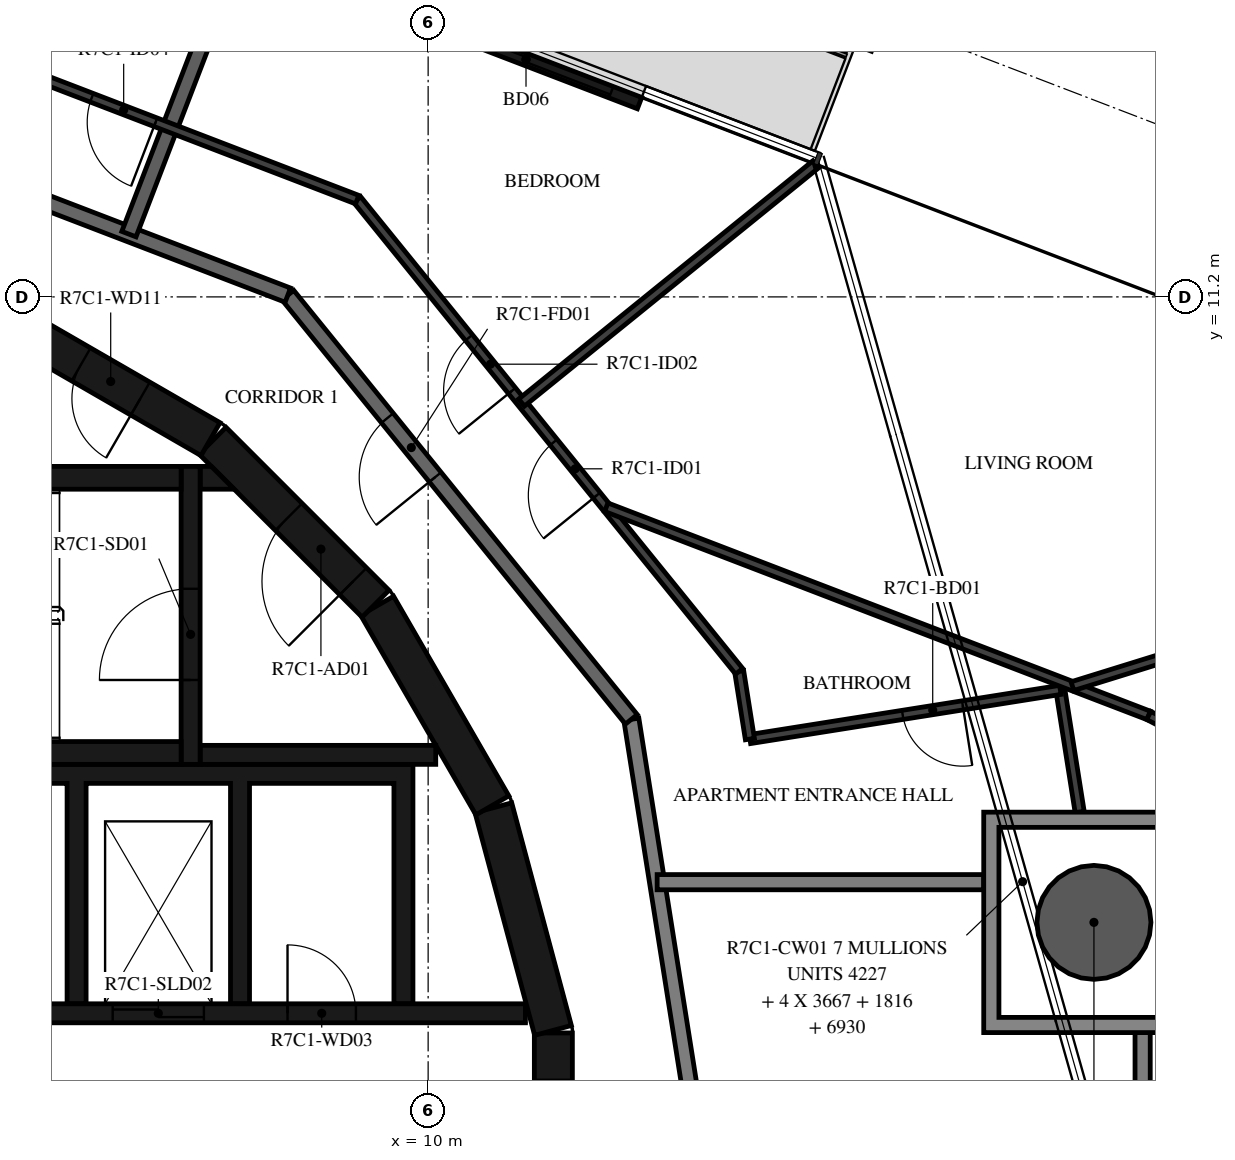
"""IFC4 building model, lengths in metres.
Left out: names, types, materials, properties, quantities, classifications, styles, units other than length and angle.
Written with IfcOpenShell. Run it as: python <this file> out.ifc"""

import sys

from ifc_helpers import new_model, si_unit, direction, frame, frame_2d, origin, origin_2d, place, context, subcontext, project, spatial, polyline, rectangle, hollow_circle, outline, extrude, element, fill, save


model = new_model("IFC4")
c1 = context("Model", 3, precision=1e-05, world=origin(), true_north=direction((0.0, 1.0)))
c2 = subcontext(c1, "Body", "Model", "MODEL_VIEW")
j1 = project(units=[si_unit("LENGTHUNIT", "METRE"), si_unit("PLANEANGLEUNIT", "RADIAN")], contexts=[c1])
p1 = place(None, origin())
s1 = spatial("IfcSite", under=j1, at=p1, CompositionType="ELEMENT")
p2 = place(p1, origin())
s2 = spatial("IfcBuilding", under=s1, at=p2, CompositionType="ELEMENT")
p3 = place(p2, frame((0.0, 0.0, 287.9)))
s3 = spatial("IfcBuildingStorey", under=s2, at=p3, CompositionType="ELEMENT", Elevation=287.9)
p4 = place(p3, frame((18.76, 2.971, -0.38), z_axis=(0.0, 0.0, 1.0), x_axis=(1.0, 0.0, 0.0)))
e1 = element("IfcColumn", 1, at=p4, inside=s3, PredefinedType="COLUMN", context=c2, shape_type="SweptSolid", body=[
    extrude(hollow_circle(Radius=0.75, WallThickness=0.035, at=origin_2d()), origin(), (0.0, 0.0, 1.0), 2.616),
])
p5 = place(p3, frame((12.781, 13.75, 0.0), z_axis=(0.0, 0.0, 1.0), x_axis=(-0.933579413923, 0.358370587381, 0.0)))
e2 = element("IfcWall", 2, at=p5, inside=s3, PredefinedType="STANDARD", context=c2, shape_type="SweptSolid", body=[
    extrude(rectangle(XDim=3.2, YDim=0.16, at=frame_2d((1.6, 0.0))), origin(), (0.0, 0.0, 1.0), 3.05),
])
p6 = place(p5, frame((0.4, 0.0, 0.0)))
e3 = element("IfcOpeningElement", 3, at=p6, cuts=e2, PredefinedType="OPENING", context=c2, shape_type="SweptSolid", body=[
    extrude(rectangle(XDim=2.4, YDim=2.4, at=frame_2d((1.2, 1.2))), frame((0.0, 0.09, 0.0), z_axis=(0.0, -1.0, 0.0), x_axis=(1.0, 0.0, 0.0)), (0.0, 0.0, 1.0), 0.18),
])
p7 = place(p3, frame((11.647, -1.516, 0.0), z_axis=(0.0, 0.0, 1.0), x_axis=(0.0, 1.0, 0.0)))
e4 = element("IfcWall", 4, at=p7, inside=s3, PredefinedType="SHEAR", context=c2, shape_type="SweptSolid", body=[
    extrude(rectangle(XDim=3.033, YDim=0.5, at=frame_2d((1.516, 0.0))), origin(), (0.0, 0.0, 1.0), 3.05),
])
p8 = place(p7, frame((0.616, 0.0, 0.0)))
e5 = element("IfcOpeningElement", 5, at=p8, cuts=e4, PredefinedType="OPENING", context=c2, shape_type="SweptSolid", body=[
    extrude(rectangle(XDim=1.8, YDim=2.1, at=frame_2d((0.9, 1.05))), frame((0.0, 0.26, 0.0), z_axis=(0.0, -1.0, 0.0), x_axis=(1.0, 0.0, 0.0)), (0.0, 0.0, 1.0), 0.52),
])
for number, where, z_axis, x_axis in (
    (6, (11.643, 1.55, 0.0), (0.0, 0.0, 1.0), (-0.259, 0.966, 0.0)),
    (7, (10.845, 4.51, 0.0), (0.0, 0.0, 1.0), (-0.5, 0.866, 0.0)),
):
    element("IfcWall", number, at=place(p3, frame(where, z_axis=z_axis, x_axis=x_axis)), inside=s3, PredefinedType="SHEAR", context=c2, shape_type="SweptSolid", body=[
        extrude(rectangle(XDim=3.033, YDim=0.5, at=frame_2d((1.516, 0.0))), origin(), (0.0, 0.0, 1.0), 3.05),
    ])
p9 = place(p3, frame((9.308, 7.164, 0.0), z_axis=(0.0, 0.0, 1.0), x_axis=(-0.707106781187, 0.707106781187, 0.0)))
e8 = element("IfcWall", 8, at=p9, inside=s3, PredefinedType="SHEAR", context=c2, shape_type="SweptSolid", body=[
    extrude(rectangle(XDim=3.032, YDim=0.5, at=frame_2d((1.516, 0.0))), origin(), (0.0, 0.0, 1.0), 3.05),
])
p10 = place(p9, frame((0.416, 0.0, 0.0)))
e9 = element("IfcOpeningElement", 9, at=p10, cuts=e8, PredefinedType="OPENING", context=c2, shape_type="SweptSolid", body=[
    extrude(rectangle(XDim=1.2, YDim=2.1, at=frame_2d((0.6, 1.05))), frame((0.0, 0.26, 0.0), z_axis=(0.0, -1.0, 0.0), x_axis=(1.0, 0.0, 0.0)), (0.0, 0.0, 1.0), 0.52),
])
p11 = place(p3, frame((7.137, 9.329, 0.0), z_axis=(0.0, 0.0, 1.0), x_axis=(-0.865975092491, 0.500087131594, 0.0)))
e10 = element("IfcWall", 10, at=p11, inside=s3, PredefinedType="SHEAR", context=c2, shape_type="SweptSolid", body=[
    extrude(rectangle(XDim=3.033, YDim=0.5, at=frame_2d((1.516, 0.0))), origin(), (0.0, 0.0, 1.0), 3.05),
])
p12 = place(p11, frame((1.066, 0.0, 0.0)))
e11 = element("IfcOpeningElement", 11, at=p12, cuts=e10, PredefinedType="OPENING", context=c2, shape_type="SweptSolid", body=[
    extrude(rectangle(XDim=0.9, YDim=2.1, at=frame_2d((0.45, 1.05))), frame((0.0, 0.26, 0.0), z_axis=(0.0, -1.0, 0.0), x_axis=(1.0, 0.0, 0.0)), (0.0, 0.0, 1.0), 0.52),
])
for number, where, z_axis, x_axis in (
    (12, (0.0, 5.2, 0.0), (0.0, 0.0, 1.0), (1.0, 0.0, 0.0)),
    (13, (0.0, 8.82, 0.0), (0.0, 0.0, 1.0), (1.0, 0.0, 0.0)),
):
    element("IfcWall", number, at=place(p3, frame(where, z_axis=z_axis, x_axis=x_axis)), inside=s3, PredefinedType="SHEAR", context=c2, shape_type="SweptSolid", body=[
        extrude(rectangle(XDim=6.75, YDim=0.3, at=frame_2d((3.375, 0.0))), origin(), (0.0, 0.0, 1.0), 3.05),
    ])
p13 = place(p3, frame((6.875, 5.05, 0.0), z_axis=(0.0, 0.0, 1.0), x_axis=(0.0, 1.0, 0.0)))
e14 = element("IfcWall", 14, at=p13, inside=s3, PredefinedType="SHEAR", context=c2, shape_type="SweptSolid", body=[
    extrude(rectangle(XDim=3.92, YDim=0.25, at=frame_2d((1.96, 0.0))), origin(), (0.0, 0.0, 1.0), 3.05),
])
p14 = place(p13, frame((1.11, 0.0, 0.0)))
e15 = element("IfcOpeningElement", 15, at=p14, cuts=e14, PredefinedType="OPENING", context=c2, shape_type="SweptSolid", body=[
    extrude(rectangle(XDim=1.2, YDim=2.1, at=frame_2d((0.6, 1.05))), frame((0.0, 0.135, 0.0), z_axis=(0.0, -1.0, 0.0), x_axis=(1.0, 0.0, 0.0)), (0.0, 0.0, 1.0), 0.27),
])
p15 = place(p3, frame((7.0, 5.175, 0.0), z_axis=(0.0, 0.0, 1.0), x_axis=(1.0, 0.0, 0.0)))
e16 = element("IfcWall", 16, at=p15, inside=s3, PredefinedType="SHEAR", context=c2, shape_type="SweptSolid", body=[
    extrude(rectangle(XDim=3.1, YDim=0.25, at=frame_2d((1.55, 0.0))), origin(), (0.0, 0.0, 1.0), 3.05),
])
p16 = place(p3, origin())
e17 = element("IfcWall", 17, at=p16, inside=s3, PredefinedType="SHEAR", context=c2, shape_type="SweptSolid", body=[
    extrude(outline(polyline([(7.448, 8.67), (7.0, 8.67), (7.0, 8.97), (7.148, 8.97), (7.448, 8.67)])), origin(), (0.0, 0.0, 1.0), 3.05),
])
p17 = place(p3, origin())
e18 = element("IfcWall", 18, at=p17, inside=s3, PredefinedType="SHEAR", context=c2, shape_type="SweptSolid", body=[
    extrude(outline(polyline([(-9.8, 1.9), (-9.55, 1.9), (-9.55, 4.8), (-5.5, 4.8), (-5.5, 1.9), (-5.25, 1.9), (-5.25, 4.8), (3.1, 4.8), (3.1, 1.9), (3.35, 1.9), (3.35, 4.8), (5.25, 4.8), (5.25, 1.9), (5.5, 1.9), (5.5, 4.8), (7.4, 4.8), (7.4, 1.9), (7.65, 1.9), (7.65, 4.8), (9.55, 4.8), (9.55, 1.9), (9.8, 1.9), (9.8, 4.8), (9.8, 5.05), (-9.8, 5.05), (-9.8, 4.8), (-9.8, 1.9)])), origin(), (0.0, 0.0, 1.0), 3.05),
])
p18 = place(p3, frame((3.35, 1.775, 0.0), z_axis=(0.0, 0.0, 1.0), x_axis=(1.0, 0.0, 0.0)))
e19 = element("IfcWall", 19, at=p18, inside=s3, PredefinedType="SHEAR", context=c2, shape_type="SweptSolid", body=[
    extrude(rectangle(XDim=7.93, YDim=0.25, at=frame_2d((3.965, 0.0))), origin(), (0.0, 0.0, 1.0), 3.05),
])
p19 = place(p18, frame((0.35, 0.0, 0.0)))
e20 = element("IfcOpeningElement", 20, at=p19, cuts=e19, PredefinedType="OPENING", context=c2, shape_type="SweptSolid", body=[
    extrude(rectangle(XDim=1.2, YDim=2.4, at=frame_2d((0.6, 1.2))), frame((0.0, 0.135, 0.0), z_axis=(0.0, -1.0, 0.0), x_axis=(1.0, 0.0, 0.0)), (0.0, 0.0, 1.0), 0.27),
])
p20 = place(p18, frame((2.5, 0.0, 0.0)))
e21 = element("IfcOpeningElement", 21, at=p20, cuts=e19, PredefinedType="OPENING", context=c2, shape_type="SweptSolid", body=[
    extrude(rectangle(XDim=1.2, YDim=2.4, at=frame_2d((0.6, 1.2))), frame((0.0, 0.135, 0.0), z_axis=(0.0, -1.0, 0.0), x_axis=(1.0, 0.0, 0.0)), (0.0, 0.0, 1.0), 0.27),
])
p21 = place(p18, frame((4.8, 0.0, 0.0)))
e22 = element("IfcOpeningElement", 22, at=p21, cuts=e19, PredefinedType="OPENING", context=c2, shape_type="SweptSolid", body=[
    extrude(rectangle(XDim=0.9, YDim=2.1, at=frame_2d((0.45, 1.05))), frame((0.0, 0.135, 0.0), z_axis=(0.0, -1.0, 0.0), x_axis=(1.0, 0.0, 0.0)), (0.0, 0.0, 1.0), 0.27),
])
p22 = place(p3, frame((13.797, -1.45, 0.0), z_axis=(0.0, 0.0, 1.0), x_axis=(-0.156421704315, 0.987690361611, 0.0)))
e23 = element("IfcWall", 23, at=p22, inside=s3, PredefinedType="STANDARD", context=c2, shape_type="SweptSolid", body=[
    extrude(rectangle(XDim=7.181, YDim=0.2, at=frame_2d((3.591, 0.0))), origin(), (0.0, 0.0, 1.0), 3.05),
])
p23 = place(p3, frame((12.673, 5.643, 0.0), z_axis=(0.0, 0.0, 1.0), x_axis=(-0.629302871585, 0.777160148113, 0.0)))
e24 = element("IfcWall", 24, at=p23, inside=s3, PredefinedType="STANDARD", context=c2, shape_type="SweptSolid", body=[
    extrude(rectangle(XDim=7.181, YDim=0.2, at=frame_2d((3.59, 0.0))), origin(), (0.0, 0.0, 1.0), 3.05),
])
p24 = place(p23, frame((4.1, 0.0, 0.0)))
e25 = element("IfcOpeningElement", 25, at=p24, cuts=e24, PredefinedType="OPENING", context=c2, shape_type="SweptSolid", body=[
    extrude(rectangle(XDim=1.0, YDim=2.1, at=frame_2d((0.5, 1.05))), frame((0.0, 0.11, 0.0), z_axis=(0.0, -1.0, 0.0), x_axis=(1.0, 0.0, 0.0)), (0.0, 0.0, 1.0), 0.22),
])
p25 = place(p3, frame((8.154, 11.223, 0.0), z_axis=(0.0, 0.0, 1.0), x_axis=(-0.93359073609, 0.358341090983, 0.0)))
e26 = element("IfcWall", 26, at=p25, inside=s3, PredefinedType="STANDARD", context=c2, shape_type="SweptSolid", body=[
    extrude(rectangle(XDim=7.181, YDim=0.2, at=frame_2d((3.59, 0.0))), origin(), (0.0, 0.0, 1.0), 3.05),
])
p26 = place(p3, frame((17.309, 3.5, 0.0), z_axis=(0.0, 0.0, 1.0), x_axis=(-1.0, 0.0, 0.0)))
e27 = element("IfcWall", 27, at=p26, inside=s3, PredefinedType="STANDARD", context=c2, shape_type="SweptSolid", body=[
    extrude(rectangle(XDim=4.297, YDim=0.2, at=frame_2d((2.148, 0.0))), origin(), (0.0, 0.0, 1.0), 3.05),
])
p27 = place(p3, frame((19.4, -3.5, 0.0), z_axis=(0.0, 0.0, 1.0), x_axis=(0.0, 1.0, 0.0)))
e28 = element("IfcWall", 28, at=p27, inside=s3, PredefinedType="STANDARD", context=c2, shape_type="SweptSolid", body=[
    extrude(rectangle(XDim=5.021, YDim=0.2, at=frame_2d((2.511, 0.0))), origin(), (0.0, 0.0, 1.0), 3.05),
])
p28 = place(p3, frame((7.532, 15.85, 0.0), z_axis=(0.0, 0.0, 1.0), x_axis=(-0.358355996975, -0.933585014571, 0.0)))
e29 = element("IfcWall", 29, at=p28, inside=s3, PredefinedType="STANDARD", context=c2, shape_type="SweptSolid", body=[
    extrude(rectangle(XDim=4.096, YDim=0.2, at=frame_2d((2.048, 0.0))), origin(), (0.0, 0.0, 1.0), 3.05),
])
p29 = place(p3, frame((18.572, 4.421, 0.0), z_axis=(0.0, 0.0, 1.0), x_axis=(-0.156347444306, 0.987702119396, 0.0)))
e30 = element("IfcWall", 30, at=p29, inside=s3, PredefinedType="PARTITIONING", context=c2, shape_type="SweptSolid", body=[
    extrude(rectangle(XDim=1.629, YDim=0.12, at=frame_2d((0.814, 0.0))), origin(), (0.0, 0.0, 1.0), 3.05),
])
p30 = place(p3, frame((18.317, 6.03, 0.0), z_axis=(0.0, 0.0, 1.0), x_axis=(-0.9876848128, -0.156456737039, 0.0)))
e31 = element("IfcWall", 31, at=p30, inside=s3, PredefinedType="PARTITIONING", context=c2, shape_type="SweptSolid", body=[
    extrude(rectangle(XDim=4.135, YDim=0.12, at=frame_2d((2.068, 0.0))), origin(), (0.0, 0.0, 1.0), 3.05),
])
p31 = place(p30, frame((1.3, 0.0, 0.0)))
e32 = element("IfcOpeningElement", 32, at=p31, cuts=e31, PredefinedType="OPENING", context=c2, shape_type="SweptSolid", body=[
    extrude(rectangle(XDim=0.8, YDim=2.1, at=frame_2d((0.4, 1.05))), frame((0.0, 0.07, 0.0), z_axis=(0.0, -1.0, 0.0), x_axis=(1.0, 0.0, 0.0)), (0.0, 0.0, 1.0), 0.14),
])
p32 = place(p3, frame((14.233, 5.383, 0.0), z_axis=(0.0, 0.0, 1.0), x_axis=(-0.156365428504, 0.987699272435, 0.0)))
e33 = element("IfcWall", 33, at=p32, inside=s3, PredefinedType="PARTITIONING", context=c2, shape_type="SweptSolid", body=[
    extrude(rectangle(XDim=0.902, YDim=0.12, at=frame_2d((0.451, 0.0))), origin(), (0.0, 0.0, 1.0), 3.05),
])
p33 = place(p3, frame((14.092, 6.274, 0.0), z_axis=(0.0, 0.0, 1.0), x_axis=(-0.62933367237, 0.777135206268, 0.0)))
e34 = element("IfcWall", 34, at=p33, inside=s3, PredefinedType="PARTITIONING", context=c2, shape_type="SweptSolid", body=[
    extrude(rectangle(XDim=7.985, YDim=0.12, at=frame_2d((3.992, 0.0))), origin(), (0.0, 0.0, 1.0), 3.05),
])
p34 = place(p33, frame((2.978, 0.0, 0.0)))
e35 = element("IfcOpeningElement", 35, at=p34, cuts=e34, PredefinedType="OPENING", context=c2, shape_type="SweptSolid", body=[
    extrude(rectangle(XDim=0.9, YDim=2.1, at=frame_2d((0.45, 1.05))), frame((0.0, 0.07, 0.0), z_axis=(0.0, -1.0, 0.0), x_axis=(1.0, 0.0, 0.0)), (0.0, 0.0, 1.0), 0.14),
])
p35 = place(p33, frame((4.749, 0.0, 0.0)))
e36 = element("IfcOpeningElement", 36, at=p35, cuts=e34, PredefinedType="OPENING", context=c2, shape_type="SweptSolid", body=[
    extrude(rectangle(XDim=0.9, YDim=2.1, at=frame_2d((0.45, 1.05))), frame((0.0, 0.07, 0.0), z_axis=(0.0, -1.0, 0.0), x_axis=(1.0, 0.0, 0.0)), (0.0, 0.0, 1.0), 0.14),
])
p36 = place(p3, frame((9.067, 12.479, 0.0), z_axis=(0.0, 0.0, 1.0), x_axis=(-0.933579449035, 0.358370495911, 0.0)))
e37 = element("IfcWall", 37, at=p36, inside=s3, PredefinedType="PARTITIONING", context=c2, shape_type="SweptSolid", body=[
    extrude(rectangle(XDim=7.985, YDim=0.12, at=frame_2d((3.992, 0.0))), origin(), (0.0, 0.0, 1.0), 3.05),
])
p37 = place(p36, frame((2.841, 0.0, 0.0)))
e38 = element("IfcOpeningElement", 38, at=p37, cuts=e37, PredefinedType="OPENING", context=c2, shape_type="SweptSolid", body=[
    extrude(rectangle(XDim=0.9, YDim=2.1, at=frame_2d((0.45, 1.05))), frame((0.0, 0.07, 0.0), z_axis=(0.0, -1.0, 0.0), x_axis=(1.0, 0.0, 0.0)), (0.0, 0.0, 1.0), 0.14),
])
p38 = place(p3, frame((12.344, 8.433, 0.0), z_axis=(0.0, 0.0, 1.0), x_axis=(0.933573435176, -0.358386162029, 0.0)))
e39 = element("IfcWall", 39, at=p38, inside=s3, PredefinedType="PARTITIONING", context=c2, shape_type="SweptSolid", body=[
    extrude(rectangle(XDim=7.644, YDim=0.12, at=frame_2d((3.822, 0.0))), origin(), (0.0, 0.0, 1.0), 3.05),
])
p39 = place(p3, frame((19.48, 5.694, 0.0), z_axis=(0.0, 0.0, 1.0), x_axis=(0.885755816688, -0.464151519662, 0.0)))
e40 = element("IfcWall", 40, at=p39, inside=s3, PredefinedType="PARTITIONING", context=c2, shape_type="SweptSolid", body=[
    extrude(rectangle(XDim=0.947, YDim=0.12, at=frame_2d((0.473, 0.0))), origin(), (0.0, 0.0, 1.0), 3.05),
])
p40 = place(p3, frame((24.883, 8.066, 0.0), z_axis=(0.0, 0.0, 1.0), x_axis=(-0.955106049863, -0.296264127958, 0.0)))
e41 = element("IfcWall", 41, at=p40, inside=s3, PredefinedType="PARTITIONING", context=c2, shape_type="SweptSolid", body=[
    extrude(rectangle(XDim=6.708, YDim=0.12, at=frame_2d((3.354, 0.0))), origin(), (0.0, 0.0, 1.0), 3.05),
])
p41 = place(p40, frame((0.4, 0.0, 0.0)))
e42 = element("IfcOpeningElement", 42, at=p41, cuts=e41, PredefinedType="OPENING", context=c2, shape_type="SweptSolid", body=[
    extrude(rectangle(XDim=0.9, YDim=2.1, at=frame_2d((0.45, 1.05))), frame((0.0, 0.07, 0.0), z_axis=(0.0, -1.0, 0.0), x_axis=(1.0, 0.0, 0.0)), (0.0, 0.0, 1.0), 0.14),
])
p42 = place(p3, frame((15.101, 12.945, 0.0), z_axis=(0.0, 0.0, 1.0), x_axis=(-0.777178675378, -0.629279990575, 0.0)))
e43 = element("IfcWall", 43, at=p42, inside=s3, PredefinedType="PARTITIONING", context=c2, shape_type="SweptSolid", body=[
    extrude(rectangle(XDim=4.982, YDim=0.12, at=frame_2d((2.491, 0.0))), origin(), (0.0, 0.0, 1.0), 3.05),
])
p43 = place(p3, origin())
e44 = element("IfcWall", 44, at=p43, inside=s3, PredefinedType="STANDARD", context=c2, shape_type="SweptSolid", body=[
    extrude(outline(polyline([(20.209, 4.421), (20.209, 1.521), (17.309, 1.521), (17.309, 4.421), (20.209, 4.421)]), holes=[polyline([(17.51, 1.721), (20.01, 1.721), (20.01, 4.221), (17.51, 4.221), (17.51, 1.721)])]), origin(), (0.0, 0.0, 1.0), 3.05),
])
p44 = place(p6, origin())
e45 = element("IfcDoor", 45, at=p44, inside=s3, OperationType="DOUBLE_DOOR_SLIDING", PredefinedType="DOOR", context=c2, shape_type="SweptSolid", body=[
    extrude(rectangle(XDim=2.4, YDim=2.4, at=frame_2d((1.2, 1.2))), frame((0.0, 0.025, 0.0), z_axis=(0.0, -1.0, 0.0), x_axis=(1.0, 0.0, 0.0)), (0.0, 0.0, 1.0), 0.05),
])
fill(e3, e45)
p45 = place(p14, origin())
e46 = element("IfcDoor", 46, at=p45, inside=s3, OperationType="SINGLE_SWING_LEFT", PredefinedType="DOOR", context=c2, shape_type="SweptSolid", body=[
    extrude(rectangle(XDim=1.2, YDim=2.1, at=frame_2d((0.6, 1.05))), frame((0.0, 0.025, 0.0), z_axis=(0.0, -1.0, 0.0), x_axis=(1.0, 0.0, 0.0)), (0.0, 0.0, 1.0), 0.05),
])
fill(e15, e46)
p46 = place(p10, origin())
e47 = element("IfcDoor", 47, at=p46, inside=s3, OperationType="SINGLE_SWING_RIGHT", PredefinedType="DOOR", context=c2, shape_type="SweptSolid", body=[
    extrude(rectangle(XDim=1.2, YDim=2.1, at=frame_2d((0.6, 1.05))), frame((0.0, 0.025, 0.0), z_axis=(0.0, -1.0, 0.0), x_axis=(1.0, 0.0, 0.0)), (0.0, 0.0, 1.0), 0.05),
])
fill(e9, e47)
p47 = place(p20, origin())
e48 = element("IfcDoor", 48, at=p47, inside=s3, OperationType="DOUBLE_DOOR_SLIDING", PredefinedType="DOOR", context=c2, shape_type="SweptSolid", body=[
    extrude(rectangle(XDim=1.2, YDim=2.4, at=frame_2d((0.6, 1.2))), frame((0.0, 0.025, 0.0), z_axis=(0.0, -1.0, 0.0), x_axis=(1.0, 0.0, 0.0)), (0.0, 0.0, 1.0), 0.05),
])
fill(e21, e48)
p48 = place(p21, origin())
e49 = element("IfcDoor", 49, at=p48, inside=s3, OperationType="SINGLE_SWING_LEFT", PredefinedType="DOOR", context=c2, shape_type="SweptSolid", body=[
    extrude(rectangle(XDim=0.9, YDim=2.1, at=frame_2d((0.45, 1.05))), frame((0.0, 0.025, 0.0), z_axis=(0.0, -1.0, 0.0), x_axis=(1.0, 0.0, 0.0)), (0.0, 0.0, 1.0), 0.05),
])
fill(e22, e49)
p49 = place(p12, origin())
e50 = element("IfcDoor", 50, at=p49, inside=s3, OperationType="SINGLE_SWING_LEFT", PredefinedType="DOOR", context=c2, shape_type="SweptSolid", body=[
    extrude(rectangle(XDim=0.9, YDim=2.1, at=frame_2d((0.45, 1.05))), frame((0.0, 0.025, 0.0), z_axis=(0.0, -1.0, 0.0), x_axis=(1.0, 0.0, 0.0)), (0.0, 0.0, 1.0), 0.05),
])
fill(e11, e50)
p50 = place(p24, origin())
e51 = element("IfcDoor", 51, at=p50, inside=s3, OperationType="SINGLE_SWING_LEFT", PredefinedType="DOOR", context=c2, shape_type="SweptSolid", body=[
    extrude(rectangle(XDim=1.0, YDim=2.1, at=frame_2d((0.5, 1.05))), frame((0.0, 0.025, 0.0), z_axis=(0.0, -1.0, 0.0), x_axis=(1.0, 0.0, 0.0)), (0.0, 0.0, 1.0), 0.05),
])
fill(e25, e51)
p51 = place(p31, origin())
e52 = element("IfcDoor", 52, at=p51, inside=s3, OperationType="SINGLE_SWING_LEFT", PredefinedType="DOOR", context=c2, shape_type="SweptSolid", body=[
    extrude(rectangle(XDim=0.8, YDim=2.1, at=frame_2d((0.4, 1.05))), frame((0.0, 0.025, 0.0), z_axis=(0.0, -1.0, 0.0), x_axis=(1.0, 0.0, 0.0)), (0.0, 0.0, 1.0), 0.05),
])
fill(e32, e52)
p52 = place(p34, origin())
e53 = element("IfcDoor", 53, at=p52, inside=s3, OperationType="SINGLE_SWING_LEFT", PredefinedType="DOOR", context=c2, shape_type="SweptSolid", body=[
    extrude(rectangle(XDim=0.9, YDim=2.1, at=frame_2d((0.45, 1.05))), frame((0.0, 0.025, 0.0), z_axis=(0.0, -1.0, 0.0), x_axis=(1.0, 0.0, 0.0)), (0.0, 0.0, 1.0), 0.05),
])
fill(e35, e53)
p53 = place(p35, origin())
e54 = element("IfcDoor", 54, at=p53, inside=s3, OperationType="SINGLE_SWING_LEFT", PredefinedType="DOOR", context=c2, shape_type="SweptSolid", body=[
    extrude(rectangle(XDim=0.9, YDim=2.1, at=frame_2d((0.45, 1.05))), frame((0.0, 0.025, 0.0), z_axis=(0.0, -1.0, 0.0), x_axis=(1.0, 0.0, 0.0)), (0.0, 0.0, 1.0), 0.05),
])
fill(e36, e54)
p54 = place(p37, origin())
e55 = element("IfcDoor", 55, at=p54, inside=s3, OperationType="SINGLE_SWING_LEFT", PredefinedType="DOOR", context=c2, shape_type="SweptSolid", body=[
    extrude(rectangle(XDim=0.9, YDim=2.1, at=frame_2d((0.45, 1.05))), frame((0.0, 0.025, 0.0), z_axis=(0.0, -1.0, 0.0), x_axis=(1.0, 0.0, 0.0)), (0.0, 0.0, 1.0), 0.05),
])
fill(e38, e55)
save(model, sys.argv[1])
